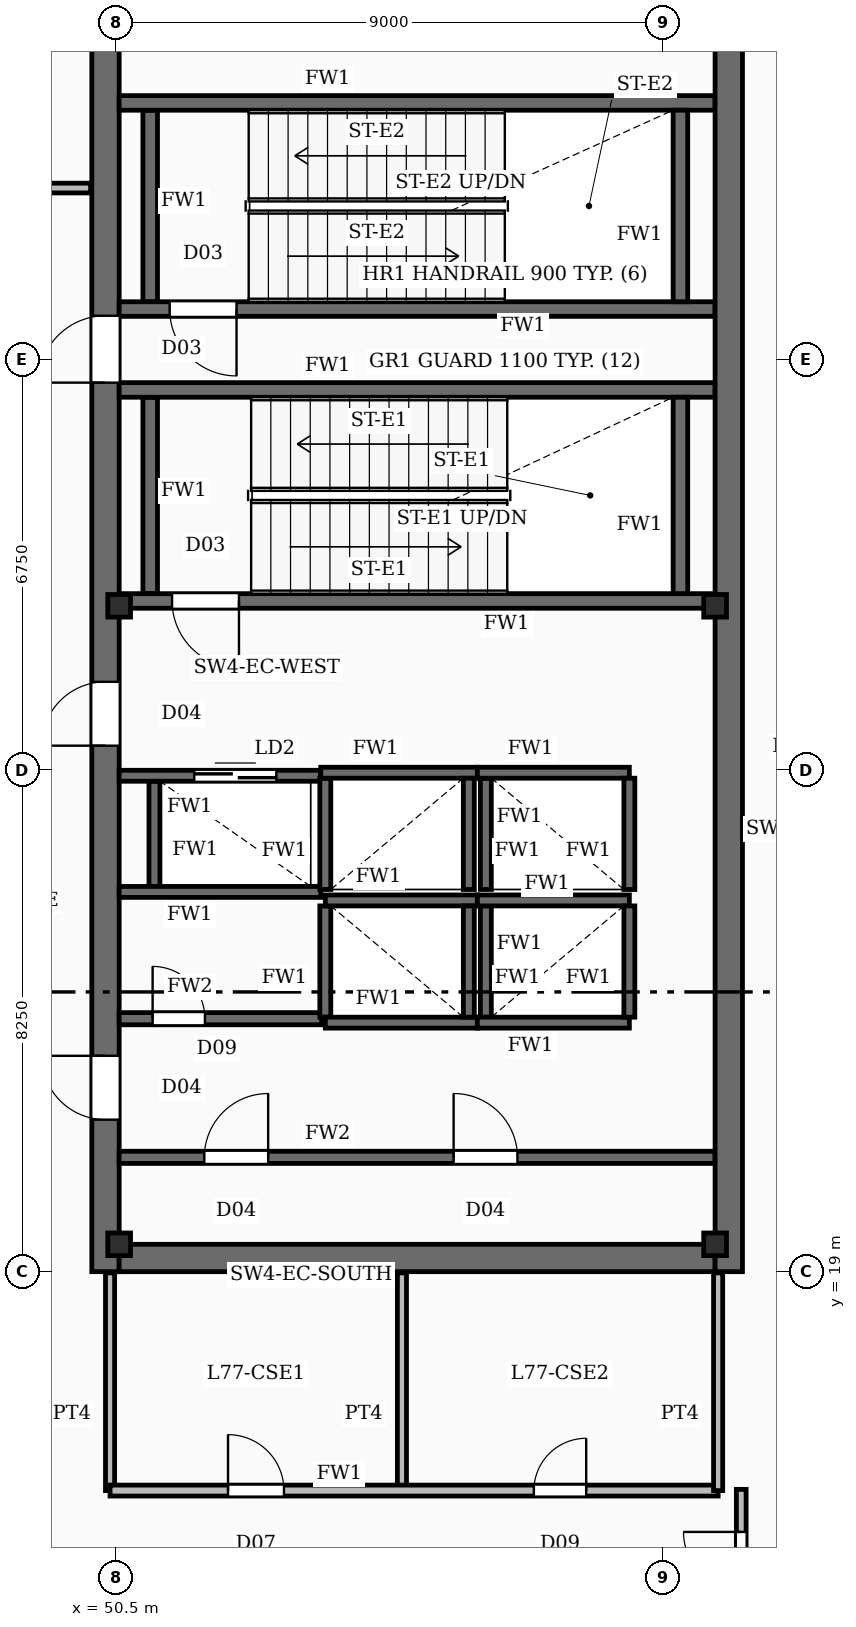
"""IFC4 building model, lengths in metres.
Left out: names, types, materials, properties, quantities, classifications, styles, units other than length and angle.
Written with IfcOpenShell. Run it as: python <this file> out.ifc"""

import sys

from ifc_helpers import new_model, si_unit, direction, frame, frame_2d, origin, origin_2d, place, context, subcontext, project, spatial, rectangle, i_section, extrude, element, fill, save


model = new_model("IFC4")
c1 = context("Model", 3, precision=1e-05, world=origin(), true_north=direction((0.0, 1.0)))
c2 = subcontext(c1, "Body", "Model", "MODEL_VIEW")
j1 = project(units=[si_unit("LENGTHUNIT", "METRE"), si_unit("PLANEANGLEUNIT", "RADIAN")], contexts=[c1])
p1 = place(None, origin())
s1 = spatial("IfcSite", under=j1, at=p1, CompositionType="ELEMENT")
p2 = place(p1, origin())
s2 = spatial("IfcBuilding", under=s1, at=p2, CompositionType="ELEMENT")
p3 = place(p2, frame((0.0, 0.0, 312.4)))
s3 = spatial("IfcBuildingStorey", under=s2, at=p3, CompositionType="ELEMENT", Elevation=312.4)
p4 = place(p3, frame((50.325, 19.0, -0.24), z_axis=(0.0, 0.0, 1.0), x_axis=(0.0, 1.0, 0.0)))
e1 = element("IfcWall", 1, at=p4, inside=s3, PredefinedType="SHEAR", context=c2, shape_type="SweptSolid", body=[
    extrude(rectangle(XDim=20.8, YDim=0.45, at=frame_2d((10.4, 0.0))), origin(), (0.0, 0.0, 1.0), 4.8),
])
p5 = place(p4, frame((2.5, 0.0, 0.24)))
e2 = element("IfcOpeningElement", 2, at=p5, cuts=e1, PredefinedType="OPENING", context=c2, shape_type="SweptSolid", body=[
    extrude(rectangle(XDim=1.05, YDim=2.15, at=frame_2d((0.525, 1.075))), frame((0.0, 0.235, 0.0), z_axis=(0.0, -1.0, 0.0), x_axis=(1.0, 0.0, 0.0)), (0.0, 0.0, 1.0), 0.47),
])
p6 = place(p4, frame((8.65, 0.0, 0.24)))
e3 = element("IfcOpeningElement", 3, at=p6, cuts=e1, PredefinedType="OPENING", context=c2, shape_type="SweptSolid", body=[
    extrude(rectangle(XDim=1.05, YDim=2.15, at=frame_2d((0.525, 1.075))), frame((0.0, 0.235, 0.0), z_axis=(0.0, -1.0, 0.0), x_axis=(1.0, 0.0, 0.0)), (0.0, 0.0, 1.0), 0.47),
])
p7 = place(p4, frame((14.62, 0.0, 0.24)))
e4 = element("IfcOpeningElement", 4, at=p7, cuts=e1, PredefinedType="OPENING", context=c2, shape_type="SweptSolid", body=[
    extrude(rectangle(XDim=1.1, YDim=2.15, at=frame_2d((0.55, 1.075))), frame((0.0, 0.235, 0.0), z_axis=(0.0, -1.0, 0.0), x_axis=(1.0, 0.0, 0.0)), (0.0, 0.0, 1.0), 0.47),
])
p8 = place(p3, frame((60.575, 19.0, -0.24), z_axis=(0.0, 0.0, 1.0), x_axis=(0.0, 1.0, 0.0)))
e5 = element("IfcWall", 5, at=p8, inside=s3, PredefinedType="SHEAR", context=c2, shape_type="SweptSolid", body=[
    extrude(rectangle(XDim=20.8, YDim=0.45, at=frame_2d((10.4, 0.0))), origin(), (0.0, 0.0, 1.0), 4.8),
])
p9 = place(p3, frame((50.55, 19.225, -0.24), z_axis=(0.0, 0.0, 1.0), x_axis=(1.0, 0.0, 0.0)))
e6 = element("IfcWall", 6, at=p9, inside=s3, PredefinedType="SHEAR", context=c2, shape_type="SweptSolid", body=[
    extrude(rectangle(XDim=9.8, YDim=0.45, at=frame_2d((4.9, 0.0))), origin(), (0.0, 0.0, 1.0), 4.8),
])
for number, where, z_axis, x_axis in (
    (7, (50.55, 19.45, -0.24), (0.0, 0.0, 1.0), (1.0, 0.0, 0.0)),
    (8, (60.35, 19.45, -0.24), (0.0, 0.0, 1.0), (1.0, 0.0, 0.0)),
    (9, (50.55, 29.95, -0.24), (0.0, 0.0, 1.0), (1.0, 0.0, 0.0)),
    (10, (60.35, 29.95, -0.24), (0.0, 0.0, 1.0), (1.0, 0.0, 0.0)),
):
    element("IfcColumn", number, at=place(p3, frame(where, z_axis=z_axis, x_axis=x_axis)), inside=s3, PredefinedType="COLUMN", context=c2, shape_type="SweptSolid", body=[
        extrude(i_section(OverallWidth=0.374, OverallDepth=0.372, WebThickness=0.016, FlangeThickness=0.026, FilletRadius=0.02, at=origin_2d()), origin(), (0.0, 0.0, 1.0), 4.8),
    ])
p10 = place(p3, frame((60.35, 30.03, 0.0), z_axis=(0.0, 0.0, 1.0), x_axis=(-1.0, 0.0, 0.0)))
e11 = element("IfcWall", 11, at=p10, inside=s3, PredefinedType="SOLIDWALL", context=c2, shape_type="SweptSolid", body=[
    extrude(rectangle(XDim=9.8, YDim=0.24, at=frame_2d((4.9, 0.0))), origin(), (0.0, 0.0, 1.0), 4.56),
])
p11 = place(p10, frame((7.83, 0.0, 0.0)))
e12 = element("IfcOpeningElement", 12, at=p11, cuts=e11, PredefinedType="OPENING", context=c2, shape_type="SweptSolid", body=[
    extrude(rectangle(XDim=1.1, YDim=2.15, at=frame_2d((0.55, 1.075))), frame((0.0, 0.13, 0.0), z_axis=(0.0, -1.0, 0.0), x_axis=(1.0, 0.0, 0.0)), (0.0, 0.0, 1.0), 0.26),
])
p12 = place(p3, frame((50.55, 33.5, 0.0), z_axis=(0.0, 0.0, 1.0), x_axis=(1.0, 0.0, 0.0)))
e13 = element("IfcWall", 13, at=p12, inside=s3, PredefinedType="SOLIDWALL", context=c2, shape_type="SweptSolid", body=[
    extrude(rectangle(XDim=9.8, YDim=0.24, at=frame_2d((4.9, 0.0))), origin(), (0.0, 0.0, 1.0), 4.56),
])
for number, where, z_axis, x_axis in (
    (14, (51.06, 30.15, 0.0), (0.0, 0.0, 1.0), (0.0, 1.0, 0.0)),
    (15, (59.78, 30.15, 0.0), (0.0, 0.0, 1.0), (0.0, 1.0, 0.0)),
):
    element("IfcWall", number, at=place(p3, frame(where, z_axis=z_axis, x_axis=x_axis)), inside=s3, PredefinedType="SOLIDWALL", context=c2, shape_type="SweptSolid", body=[
        extrude(rectangle(XDim=3.23, YDim=0.24, at=frame_2d((1.615, 0.0))), origin(), (0.0, 0.0, 1.0), 4.56),
    ])
p13 = place(p3, frame((60.35, 34.83, 0.0), z_axis=(0.0, 0.0, 1.0), x_axis=(-1.0, 0.0, 0.0)))
e16 = element("IfcWall", 16, at=p13, inside=s3, PredefinedType="SOLIDWALL", context=c2, shape_type="SweptSolid", body=[
    extrude(rectangle(XDim=9.8, YDim=0.24, at=frame_2d((4.9, 0.0))), origin(), (0.0, 0.0, 1.0), 4.56),
])
p14 = place(p13, frame((7.87, 0.0, 0.0)))
e17 = element("IfcOpeningElement", 17, at=p14, cuts=e16, PredefinedType="OPENING", context=c2, shape_type="SweptSolid", body=[
    extrude(rectangle(XDim=1.1, YDim=2.15, at=frame_2d((0.55, 1.075))), frame((0.0, 0.13, 0.0), z_axis=(0.0, -1.0, 0.0), x_axis=(1.0, 0.0, 0.0)), (0.0, 0.0, 1.0), 0.26),
])
p15 = place(p3, frame((50.55, 38.22, 0.0), z_axis=(0.0, 0.0, 1.0), x_axis=(1.0, 0.0, 0.0)))
e18 = element("IfcWall", 18, at=p15, inside=s3, PredefinedType="SOLIDWALL", context=c2, shape_type="SweptSolid", body=[
    extrude(rectangle(XDim=9.8, YDim=0.24, at=frame_2d((4.9, 0.0))), origin(), (0.0, 0.0, 1.0), 4.56),
])
for number, where, z_axis, x_axis in (
    (19, (51.06, 34.95, 0.0), (0.0, 0.0, 1.0), (0.0, 1.0, 0.0)),
    (20, (59.78, 34.95, 0.0), (0.0, 0.0, 1.0), (0.0, 1.0, 0.0)),
):
    element("IfcWall", number, at=place(p3, frame(where, z_axis=z_axis, x_axis=x_axis)), inside=s3, PredefinedType="SOLIDWALL", context=c2, shape_type="SweptSolid", body=[
        extrude(rectangle(XDim=3.15, YDim=0.24, at=frame_2d((1.575, 0.0))), origin(), (0.0, 0.0, 1.0), 4.56),
    ])
for number, where, z_axis, x_axis in (
    (21, (53.94, 25.105, 0.0), (0.0, 0.0, 1.0), (1.0, 0.0, 0.0)),
    (22, (53.94, 23.095, 0.0), (0.0, 0.0, 1.0), (1.0, 0.0, 0.0)),
):
    element("IfcWall", number, at=place(p3, frame(where, z_axis=z_axis, x_axis=x_axis)), inside=s3, PredefinedType="SOLIDWALL", context=c2, shape_type="SweptSolid", body=[
        extrude(rectangle(XDim=2.5, YDim=0.18, at=frame_2d((1.25, 0.0))), origin(), (0.0, 0.0, 1.0), 4.56),
    ])
for number, where, z_axis, x_axis in (
    (23, (53.94, 23.185, 0.0), (0.0, 0.0, 1.0), (0.0, 1.0, 0.0)),
    (24, (56.3, 23.185, 0.0), (0.0, 0.0, 1.0), (0.0, 1.0, 0.0)),
):
    element("IfcWall", number, at=place(p3, frame(where, z_axis=z_axis, x_axis=x_axis)), inside=s3, PredefinedType="SOLIDWALL", context=c2, shape_type="SweptSolid", body=[
        extrude(rectangle(XDim=1.83, YDim=0.18, at=frame_2d((0.915, 0.0))), origin(), (0.0, 0.0, 1.0), 4.56),
    ])
for number, where, z_axis, x_axis in (
    (25, (56.44, 25.105, 0.0), (0.0, 0.0, 1.0), (1.0, 0.0, 0.0)),
    (26, (56.44, 23.095, 0.0), (0.0, 0.0, 1.0), (1.0, 0.0, 0.0)),
):
    element("IfcWall", number, at=place(p3, frame(where, z_axis=z_axis, x_axis=x_axis)), inside=s3, PredefinedType="SOLIDWALL", context=c2, shape_type="SweptSolid", body=[
        extrude(rectangle(XDim=2.5, YDim=0.18, at=frame_2d((1.25, 0.0))), origin(), (0.0, 0.0, 1.0), 4.56),
    ])
for number, where, z_axis, x_axis in (
    (27, (56.58, 23.185, 0.0), (0.0, 0.0, 1.0), (0.0, 1.0, 0.0)),
    (28, (58.94, 23.185, 0.0), (0.0, 0.0, 1.0), (0.0, 1.0, 0.0)),
):
    element("IfcWall", number, at=place(p3, frame(where, z_axis=z_axis, x_axis=x_axis)), inside=s3, PredefinedType="SOLIDWALL", context=c2, shape_type="SweptSolid", body=[
        extrude(rectangle(XDim=1.83, YDim=0.18, at=frame_2d((0.915, 0.0))), origin(), (0.0, 0.0, 1.0), 4.56),
    ])
p16 = place(p3, frame((53.865, 27.205, 0.0), z_axis=(0.0, 0.0, 1.0), x_axis=(1.0, 0.0, 0.0)))
e29 = element("IfcWall", 29, at=p16, inside=s3, PredefinedType="SOLIDWALL", context=c2, shape_type="SweptSolid", body=[
    extrude(rectangle(XDim=2.575, YDim=0.18, at=frame_2d((1.288, 0.0))), origin(), (0.0, 0.0, 1.0), 4.56),
])
for number, where, z_axis, x_axis in (
    (30, (53.94, 25.285, 0.0), (0.0, 0.0, 1.0), (0.0, 1.0, 0.0)),
    (31, (56.3, 25.285, 0.0), (0.0, 0.0, 1.0), (0.0, 1.0, 0.0)),
):
    element("IfcWall", number, at=place(p3, frame(where, z_axis=z_axis, x_axis=x_axis)), inside=s3, PredefinedType="SOLIDWALL", context=c2, shape_type="SweptSolid", body=[
        extrude(rectangle(XDim=1.83, YDim=0.18, at=frame_2d((0.915, 0.0))), origin(), (0.0, 0.0, 1.0), 4.56),
    ])
p17 = place(p3, frame((56.44, 27.205, 0.0), z_axis=(0.0, 0.0, 1.0), x_axis=(1.0, 0.0, 0.0)))
e32 = element("IfcWall", 32, at=p17, inside=s3, PredefinedType="SOLIDWALL", context=c2, shape_type="SweptSolid", body=[
    extrude(rectangle(XDim=2.5, YDim=0.18, at=frame_2d((1.25, 0.0))), origin(), (0.0, 0.0, 1.0), 4.56),
])
for number, where, z_axis, x_axis in (
    (33, (56.58, 25.285, 0.0), (0.0, 0.0, 1.0), (0.0, 1.0, 0.0)),
    (34, (58.94, 25.285, 0.0), (0.0, 0.0, 1.0), (0.0, 1.0, 0.0)),
):
    element("IfcWall", number, at=place(p3, frame(where, z_axis=z_axis, x_axis=x_axis)), inside=s3, PredefinedType="SOLIDWALL", context=c2, shape_type="SweptSolid", body=[
        extrude(rectangle(XDim=1.83, YDim=0.18, at=frame_2d((0.915, 0.0))), origin(), (0.0, 0.0, 1.0), 4.56),
    ])
p18 = place(p3, frame((50.55, 27.155, 0.0), z_axis=(0.0, 0.0, 1.0), x_axis=(1.0, 0.0, 0.0)))
e35 = element("IfcWall", 35, at=p18, inside=s3, PredefinedType="SOLIDWALL", context=c2, shape_type="SweptSolid", body=[
    extrude(rectangle(XDim=3.315, YDim=0.18, at=frame_2d((1.657, 0.0))), origin(), (0.0, 0.0, 1.0), 4.56),
])
p19 = place(p18, frame((1.235, 0.0, 0.0)))
e36 = element("IfcOpeningElement", 36, at=p19, cuts=e35, PredefinedType="OPENING", context=c2, shape_type="SweptSolid", body=[
    extrude(rectangle(XDim=1.35, YDim=2.3, at=frame_2d((0.675, 1.15))), frame((0.0, 0.1, 0.0), z_axis=(0.0, -1.0, 0.0), x_axis=(1.0, 0.0, 0.0)), (0.0, 0.0, 1.0), 0.2),
])
p20 = place(p3, frame((50.55, 25.245, 0.0), z_axis=(0.0, 0.0, 1.0), x_axis=(1.0, 0.0, 0.0)))
e37 = element("IfcWall", 37, at=p20, inside=s3, PredefinedType="SOLIDWALL", context=c2, shape_type="SweptSolid", body=[
    extrude(rectangle(XDim=3.315, YDim=0.18, at=frame_2d((1.657, 0.0))), origin(), (0.0, 0.0, 1.0), 4.56),
])
p21 = place(p3, frame((51.13, 25.335, 0.0), z_axis=(0.0, 0.0, 1.0), x_axis=(0.0, 1.0, 0.0)))
e38 = element("IfcWall", 38, at=p21, inside=s3, PredefinedType="SOLIDWALL", context=c2, shape_type="SweptSolid", body=[
    extrude(rectangle(XDim=1.73, YDim=0.18, at=frame_2d((0.865, 0.0))), origin(), (0.0, 0.0, 1.0), 4.56),
])
p22 = place(p3, frame((50.55, 20.88, 0.0), z_axis=(0.0, 0.0, 1.0), x_axis=(1.0, 0.0, 0.0)))
e39 = element("IfcWall", 39, at=p22, inside=s3, PredefinedType="SOLIDWALL", context=c2, shape_type="SweptSolid", body=[
    extrude(rectangle(XDim=9.8, YDim=0.2, at=frame_2d((4.9, 0.0))), origin(), (0.0, 0.0, 1.0), 3.62),
])
p23 = place(p22, frame((1.4, 0.0, 0.0)))
e40 = element("IfcOpeningElement", 40, at=p23, cuts=e39, PredefinedType="OPENING", context=c2, shape_type="SweptSolid", body=[
    extrude(rectangle(XDim=1.05, YDim=2.15, at=frame_2d((0.525, 1.075))), frame((0.0, 0.11, 0.0), z_axis=(0.0, -1.0, 0.0), x_axis=(1.0, 0.0, 0.0)), (0.0, 0.0, 1.0), 0.22),
])
p24 = place(p22, frame((5.5, 0.0, 0.0)))
e41 = element("IfcOpeningElement", 41, at=p24, cuts=e39, PredefinedType="OPENING", context=c2, shape_type="SweptSolid", body=[
    extrude(rectangle(XDim=1.05, YDim=2.15, at=frame_2d((0.525, 1.075))), frame((0.0, 0.11, 0.0), z_axis=(0.0, -1.0, 0.0), x_axis=(1.0, 0.0, 0.0)), (0.0, 0.0, 1.0), 0.22),
])
p25 = place(p3, frame((50.55, 23.16, 0.0), z_axis=(0.0, 0.0, 1.0), x_axis=(1.0, 0.0, 0.0)))
e42 = element("IfcWall", 42, at=p25, inside=s3, PredefinedType="SOLIDWALL", context=c2, shape_type="SweptSolid", body=[
    extrude(rectangle(XDim=3.33, YDim=0.2, at=frame_2d((1.665, 0.0))), origin(), (0.0, 0.0, 1.0), 3.62),
])
p26 = place(p25, frame((0.55, 0.0, 0.0)))
e43 = element("IfcOpeningElement", 43, at=p26, cuts=e42, PredefinedType="OPENING", context=c2, shape_type="SweptSolid", body=[
    extrude(rectangle(XDim=0.86, YDim=2.05, at=frame_2d((0.43, 1.025))), frame((0.0, 0.11, 0.0), z_axis=(0.0, -1.0, 0.0), x_axis=(1.0, 0.0, 0.0)), (0.0, 0.0, 1.0), 0.22),
])
p27 = place(p3, frame((55.2, 15.4, 0.0), z_axis=(0.0, 0.0, 1.0), x_axis=(0.0, 1.0, 0.0)))
e44 = element("IfcWall", 44, at=p27, inside=s3, PredefinedType="PARTITIONING", context=c2, shape_type="SweptSolid", body=[
    extrude(rectangle(XDim=3.58, YDim=0.15, at=frame_2d((1.79, 0.0))), origin(), (0.0, 0.0, 1.0), 3.62),
])
p28 = place(p3, frame((50.4, 15.4, 0.0), z_axis=(0.0, 0.0, 1.0), x_axis=(1.0, 0.0, 0.0)))
e45 = element("IfcWall", 45, at=p28, inside=s3, PredefinedType="SOLIDWALL", context=c2, shape_type="SweptSolid", body=[
    extrude(rectangle(XDim=10.0, YDim=0.18, at=frame_2d((5.0, 0.0))), origin(), (0.0, 0.0, 1.0), 3.62),
])
p29 = place(p28, frame((1.94, 0.0, 0.0)))
e46 = element("IfcOpeningElement", 46, at=p29, cuts=e45, PredefinedType="OPENING", context=c2, shape_type="SweptSolid", body=[
    extrude(rectangle(XDim=0.92, YDim=2.1, at=frame_2d((0.46, 1.05))), frame((0.0, 0.1, 0.0), z_axis=(0.0, -1.0, 0.0), x_axis=(1.0, 0.0, 0.0)), (0.0, 0.0, 1.0), 0.2),
])
p30 = place(p28, frame((6.97, 0.0, 0.0)))
e47 = element("IfcOpeningElement", 47, at=p30, cuts=e45, PredefinedType="OPENING", context=c2, shape_type="SweptSolid", body=[
    extrude(rectangle(XDim=0.86, YDim=2.05, at=frame_2d((0.43, 1.025))), frame((0.0, 0.1, 0.0), z_axis=(0.0, -1.0, 0.0), x_axis=(1.0, 0.0, 0.0)), (0.0, 0.0, 1.0), 0.2),
])
for number, where, z_axis, x_axis in (
    (48, (50.4, 15.4, 0.0), (0.0, 0.0, 1.0), (0.0, 1.0, 0.0)),
    (49, (60.4, 15.4, 0.0), (0.0, 0.0, 1.0), (0.0, 1.0, 0.0)),
):
    element("IfcWall", number, at=place(p3, frame(where, z_axis=z_axis, x_axis=x_axis)), inside=s3, PredefinedType="PARTITIONING", context=c2, shape_type="SweptSolid", body=[
        extrude(rectangle(XDim=3.58, YDim=0.15, at=frame_2d((1.79, 0.0))), origin(), (0.0, 0.0, 1.0), 3.62),
    ])
p31 = place(p3, frame((24.82, 36.82, 0.0), z_axis=(0.0, 0.0, 1.0), x_axis=(1.0, 0.0, 0.0)))
e50 = element("IfcWall", 50, at=p31, inside=s3, PredefinedType="PARTITIONING", context=c2, shape_type="SweptSolid", body=[
    extrude(rectangle(XDim=25.26, YDim=0.16, at=frame_2d((12.63, 0.0))), origin(), (0.0, 0.0, 1.0), 3.62),
])
p32 = place(p31, frame((3.5, 0.0, 0.0)))
e51 = element("IfcOpeningElement", 51, at=p32, cuts=e50, PredefinedType="OPENING", context=c2, shape_type="SweptSolid", body=[
    extrude(rectangle(XDim=1.6, YDim=2.15, at=frame_2d((0.8, 1.075))), frame((0.0, 0.09, 0.0), z_axis=(0.0, -1.0, 0.0), x_axis=(1.0, 0.0, 0.0)), (0.0, 0.0, 1.0), 0.18),
])
p33 = place(p31, frame((17.5, 0.0, 0.0)))
e52 = element("IfcOpeningElement", 52, at=p33, cuts=e50, PredefinedType="OPENING", context=c2, shape_type="SweptSolid", body=[
    extrude(rectangle(XDim=1.6, YDim=2.15, at=frame_2d((0.8, 1.075))), frame((0.0, 0.09, 0.0), z_axis=(0.0, -1.0, 0.0), x_axis=(1.0, 0.0, 0.0)), (0.0, 0.0, 1.0), 0.18),
])
p34 = place(p3, frame((60.78, 13.12, 0.0), z_axis=(0.0, 0.0, 1.0), x_axis=(0.0, 1.0, 0.0)))
e53 = element("IfcWall", 53, at=p34, inside=s3, PredefinedType="PARTITIONING", context=c2, shape_type="SweptSolid", body=[
    extrude(rectangle(XDim=2.3, YDim=0.16, at=frame_2d((1.15, 0.0))), origin(), (0.0, 0.0, 1.0), 3.62),
])
p35 = place(p34, frame((0.65, 0.0, 0.0)))
e54 = element("IfcOpeningElement", 54, at=p35, cuts=e53, PredefinedType="OPENING", context=c2, shape_type="SweptSolid", body=[
    extrude(rectangle(XDim=0.95, YDim=2.15, at=frame_2d((0.475, 1.075))), frame((0.0, 0.09, 0.0), z_axis=(0.0, -1.0, 0.0), x_axis=(1.0, 0.0, 0.0)), (0.0, 0.0, 1.0), 0.18),
])
p36 = place(p5, origin())
e55 = element("IfcDoor", 55, at=p36, inside=s3, OperationType="SINGLE_SWING_RIGHT", PredefinedType="DOOR", context=c2, shape_type="SweptSolid", body=[
    extrude(rectangle(XDim=1.05, YDim=2.15, at=frame_2d((0.525, 1.075))), frame((0.0, 0.025, 0.0), z_axis=(0.0, -1.0, 0.0), x_axis=(1.0, 0.0, 0.0)), (0.0, 0.0, 1.0), 0.05),
])
fill(e2, e55)
p37 = place(p6, origin())
e56 = element("IfcDoor", 56, at=p37, inside=s3, OperationType="SINGLE_SWING_LEFT", PredefinedType="DOOR", context=c2, shape_type="SweptSolid", body=[
    extrude(rectangle(XDim=1.05, YDim=2.15, at=frame_2d((0.525, 1.075))), frame((0.0, 0.025, 0.0), z_axis=(0.0, -1.0, 0.0), x_axis=(1.0, 0.0, 0.0)), (0.0, 0.0, 1.0), 0.05),
])
fill(e3, e56)
p38 = place(p7, origin())
e57 = element("IfcDoor", 57, at=p38, inside=s3, OperationType="SINGLE_SWING_LEFT", PredefinedType="DOOR", context=c2, shape_type="SweptSolid", body=[
    extrude(rectangle(XDim=1.1, YDim=2.15, at=frame_2d((0.55, 1.075))), frame((0.0, 0.025, 0.0), z_axis=(0.0, -1.0, 0.0), x_axis=(1.0, 0.0, 0.0)), (0.0, 0.0, 1.0), 0.05),
])
fill(e4, e57)
p39 = place(p11, origin())
e58 = element("IfcDoor", 58, at=p39, inside=s3, OperationType="SINGLE_SWING_LEFT", PredefinedType="DOOR", context=c2, shape_type="SweptSolid", body=[
    extrude(rectangle(XDim=1.1, YDim=2.15, at=frame_2d((0.55, 1.075))), frame((0.0, 0.025, 0.0), z_axis=(0.0, -1.0, 0.0), x_axis=(1.0, 0.0, 0.0)), (0.0, 0.0, 1.0), 0.05),
])
fill(e12, e58)
p40 = place(p14, origin())
e59 = element("IfcDoor", 59, at=p40, inside=s3, OperationType="SINGLE_SWING_LEFT", PredefinedType="DOOR", context=c2, shape_type="SweptSolid", body=[
    extrude(rectangle(XDim=1.1, YDim=2.15, at=frame_2d((0.55, 1.075))), frame((0.0, 0.025, 0.0), z_axis=(0.0, -1.0, 0.0), x_axis=(1.0, 0.0, 0.0)), (0.0, 0.0, 1.0), 0.05),
])
fill(e17, e59)
p41 = place(p19, origin())
e60 = element("IfcDoor", 60, at=p41, inside=s3, OperationType="DOUBLE_DOOR_SLIDING", PredefinedType="DOOR", context=c2, shape_type="SweptSolid", body=[
    extrude(rectangle(XDim=1.35, YDim=2.3, at=frame_2d((0.675, 1.15))), frame((0.0, 0.025, 0.0), z_axis=(0.0, -1.0, 0.0), x_axis=(1.0, 0.0, 0.0)), (0.0, 0.0, 1.0), 0.05),
])
fill(e36, e60)
p42 = place(p23, origin())
e61 = element("IfcDoor", 61, at=p42, inside=s3, OperationType="SINGLE_SWING_RIGHT", PredefinedType="DOOR", context=c2, shape_type="SweptSolid", body=[
    extrude(rectangle(XDim=1.05, YDim=2.15, at=frame_2d((0.525, 1.075))), frame((0.0, 0.025, 0.0), z_axis=(0.0, -1.0, 0.0), x_axis=(1.0, 0.0, 0.0)), (0.0, 0.0, 1.0), 0.05),
])
fill(e40, e61)
p43 = place(p24, origin())
e62 = element("IfcDoor", 62, at=p43, inside=s3, OperationType="SINGLE_SWING_LEFT", PredefinedType="DOOR", context=c2, shape_type="SweptSolid", body=[
    extrude(rectangle(XDim=1.05, YDim=2.15, at=frame_2d((0.525, 1.075))), frame((0.0, 0.025, 0.0), z_axis=(0.0, -1.0, 0.0), x_axis=(1.0, 0.0, 0.0)), (0.0, 0.0, 1.0), 0.05),
])
fill(e41, e62)
p44 = place(p26, origin())
e63 = element("IfcDoor", 63, at=p44, inside=s3, OperationType="SINGLE_SWING_LEFT", PredefinedType="DOOR", context=c2, shape_type="SweptSolid", body=[
    extrude(rectangle(XDim=0.86, YDim=2.05, at=frame_2d((0.43, 1.025))), frame((0.0, 0.025, 0.0), z_axis=(0.0, -1.0, 0.0), x_axis=(1.0, 0.0, 0.0)), (0.0, 0.0, 1.0), 0.05),
])
fill(e43, e63)
p45 = place(p29, origin())
e64 = element("IfcDoor", 64, at=p45, inside=s3, OperationType="SINGLE_SWING_LEFT", PredefinedType="DOOR", context=c2, shape_type="SweptSolid", body=[
    extrude(rectangle(XDim=0.92, YDim=2.1, at=frame_2d((0.46, 1.05))), frame((0.0, 0.025, 0.0), z_axis=(0.0, -1.0, 0.0), x_axis=(1.0, 0.0, 0.0)), (0.0, 0.0, 1.0), 0.05),
])
fill(e46, e64)
p46 = place(p30, origin())
e65 = element("IfcDoor", 65, at=p46, inside=s3, OperationType="SINGLE_SWING_RIGHT", PredefinedType="DOOR", context=c2, shape_type="SweptSolid", body=[
    extrude(rectangle(XDim=0.86, YDim=2.05, at=frame_2d((0.43, 1.025))), frame((0.0, 0.025, 0.0), z_axis=(0.0, -1.0, 0.0), x_axis=(1.0, 0.0, 0.0)), (0.0, 0.0, 1.0), 0.05),
])
fill(e47, e65)
p47 = place(p35, origin())
e66 = element("IfcDoor", 66, at=p47, inside=s3, OperationType="SINGLE_SWING_RIGHT", PredefinedType="DOOR", context=c2, shape_type="SweptSolid", body=[
    extrude(rectangle(XDim=0.95, YDim=2.15, at=frame_2d((0.475, 1.075))), frame((0.0, 0.025, 0.0), z_axis=(0.0, -1.0, 0.0), x_axis=(1.0, 0.0, 0.0)), (0.0, 0.0, 1.0), 0.05),
])
fill(e54, e66)
save(model, sys.argv[1])
